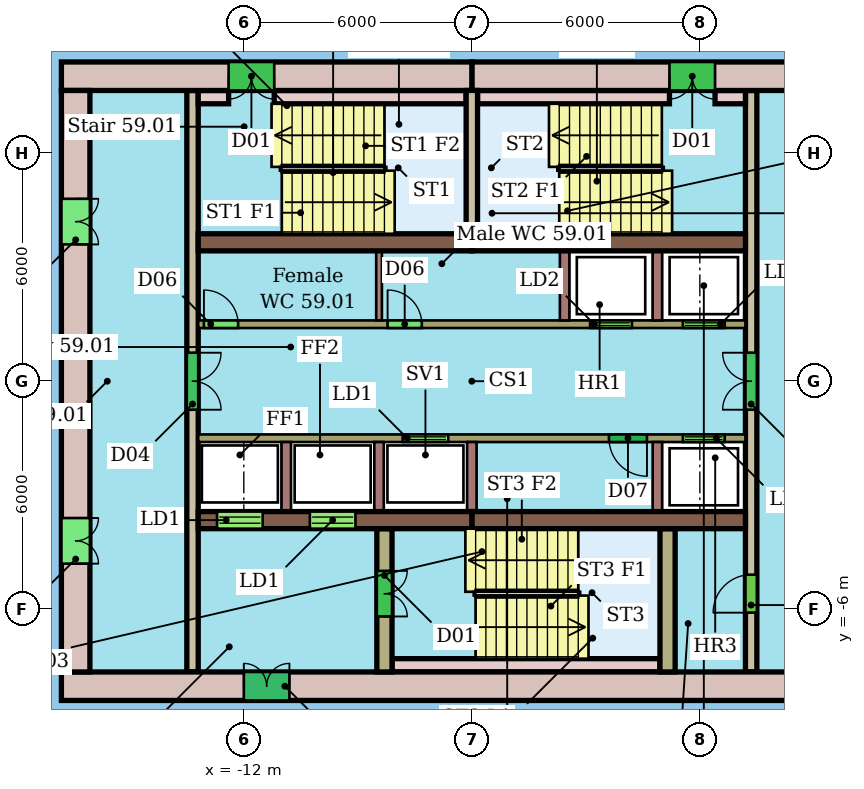
"""IFC4 building model, lengths in metres.
Left out: names, types, materials, properties, quantities, classifications, styles, units other than length and angle.
Written with IfcOpenShell. Run it as: python <this file> out.ifc"""

import sys

from ifc_helpers import new_model, si_unit, direction, frame, frame_2d, origin, place, context, subcontext, project, spatial, rectangle, extrude, element, fill, save


model = new_model("IFC4")
c1 = context("Model", 3, precision=1e-05, world=origin(), true_north=direction((0.0, 1.0)))
c2 = subcontext(c1, "Body", "Model", "MODEL_VIEW")
j1 = project(units=[si_unit("LENGTHUNIT", "METRE"), si_unit("PLANEANGLEUNIT", "RADIAN")], contexts=[c1])
p1 = place(None, origin())
s1 = spatial("IfcSite", under=j1, at=p1, CompositionType="ELEMENT")
p2 = place(p1, origin())
s2 = spatial("IfcBuilding", under=s1, at=p2, CompositionType="ELEMENT")
p3 = place(p2, frame((0.0, 0.0, 238.9)))
s3 = spatial("IfcBuildingStorey", under=s2, at=p3, CompositionType="ELEMENT", Elevation=238.9)
p4 = place(p3, frame((4.8, 8.025, 0.0), z_axis=(0.0, 0.0, 1.0), x_axis=(-1.0, 0.0, 0.0)))
e1 = element("IfcWall", 1, at=p4, inside=s3, PredefinedType="SHEAR", context=c2, shape_type="SweptSolid", body=[
    extrude(rectangle(XDim=10.8, YDim=0.75, at=frame_2d((5.4, 0.0))), origin(), (0.0, 0.0, 1.0), 3.3),
])
p5 = place(p4, frame((4.4, 0.0, 0.0)))
e2 = element("IfcOpeningElement", 2, at=p5, cuts=e1, PredefinedType="OPENING", context=c2, shape_type="SweptSolid", body=[
    extrude(rectangle(XDim=1.2, YDim=2.1, at=frame_2d((0.6, 1.05))), frame((0.0, 0.385, 0.0), z_axis=(0.0, -1.0, 0.0), x_axis=(1.0, 0.0, 0.0)), (0.0, 0.0, 1.0), 0.77),
])
p6 = place(p3, frame((-6.0, 8.025, 0.0), z_axis=(0.0, 0.0, 1.0), x_axis=(-1.0, 0.0, 0.0)))
e3 = element("IfcWall", 3, at=p6, inside=s3, PredefinedType="SHEAR", context=c2, shape_type="SweptSolid", body=[
    extrude(rectangle(XDim=10.8, YDim=0.75, at=frame_2d((5.4, 0.0))), origin(), (0.0, 0.0, 1.0), 3.3),
])
p7 = place(p6, frame((5.2, 0.0, 0.0)))
e4 = element("IfcOpeningElement", 4, at=p7, cuts=e3, PredefinedType="OPENING", context=c2, shape_type="SweptSolid", body=[
    extrude(rectangle(XDim=1.2, YDim=2.1, at=frame_2d((0.6, 1.05))), frame((0.0, 0.385, 0.0), z_axis=(0.0, -1.0, 0.0), x_axis=(1.0, 0.0, 0.0)), (0.0, 0.0, 1.0), 0.77),
])
p8 = place(p3, frame((-16.8, -8.025, 0.0), z_axis=(0.0, 0.0, 1.0), x_axis=(1.0, 0.0, 0.0)))
e5 = element("IfcWall", 5, at=p8, inside=s3, PredefinedType="SHEAR", context=c2, shape_type="SweptSolid", body=[
    extrude(rectangle(XDim=21.6, YDim=0.75, at=frame_2d((10.8, 0.0))), origin(), (0.0, 0.0, 1.0), 3.3),
])
p9 = place(p8, frame((4.8, 0.0, 0.0)))
e6 = element("IfcOpeningElement", 6, at=p9, cuts=e5, PredefinedType="OPENING", context=c2, shape_type="SweptSolid", body=[
    extrude(rectangle(XDim=1.2, YDim=2.1, at=frame_2d((0.6, 1.05))), frame((0.0, 0.385, 0.0), z_axis=(0.0, -1.0, 0.0), x_axis=(1.0, 0.0, 0.0)), (0.0, 0.0, 1.0), 0.77),
])
p10 = place(p3, frame((-16.425, 7.65, 0.0), z_axis=(0.0, 0.0, 1.0), x_axis=(0.0, -1.0, 0.0)))
e7 = element("IfcWall", 7, at=p10, inside=s3, PredefinedType="SHEAR", context=c2, shape_type="SweptSolid", body=[
    extrude(rectangle(XDim=15.3, YDim=0.75, at=frame_2d((7.65, 0.0))), origin(), (0.0, 0.0, 1.0), 3.3),
])
p11 = place(p10, frame((11.25, 0.0, 0.0)))
e8 = element("IfcOpeningElement", 8, at=p11, cuts=e7, PredefinedType="OPENING", context=c2, shape_type="SweptSolid", body=[
    extrude(rectangle(XDim=1.2, YDim=2.1, at=frame_2d((0.6, 1.05))), frame((0.0, 0.385, 0.0), z_axis=(0.0, -1.0, 0.0), x_axis=(1.0, 0.0, 0.0)), (0.0, 0.0, 1.0), 0.77),
])
p12 = place(p10, frame((2.85, 0.0, 0.0)))
e9 = element("IfcOpeningElement", 9, at=p12, cuts=e7, PredefinedType="OPENING", context=c2, shape_type="SweptSolid", body=[
    extrude(rectangle(XDim=1.2, YDim=2.1, at=frame_2d((0.6, 1.05))), frame((0.0, 0.385, 0.0), z_axis=(0.0, -1.0, 0.0), x_axis=(1.0, 0.0, 0.0)), (0.0, 0.0, 1.0), 0.77),
])
for number, where, z_axis, x_axis in (
    (10, (-13.2, 3.655, 0.0), (0.0, 0.0, 1.0), (1.0, 0.0, 0.0)),
    (11, (-6.0, 3.655, 0.0), (0.0, 0.0, 1.0), (1.0, 0.0, 0.0)),
):
    element("IfcWall", number, at=place(p3, frame(where, z_axis=z_axis, x_axis=x_axis)), inside=s3, PredefinedType="SHEAR", context=c2, shape_type="SweptSolid", body=[
        extrude(rectangle(XDim=7.2, YDim=0.45, at=frame_2d((3.6, 0.0))), origin(), (0.0, 0.0, 1.0), 3.3),
    ])
p13 = place(p3, frame((-13.2, -3.655, 0.0), z_axis=(0.0, 0.0, 1.0), x_axis=(1.0, 0.0, 0.0)))
e12 = element("IfcWall", 12, at=p13, inside=s3, PredefinedType="SHEAR", context=c2, shape_type="SweptSolid", body=[
    extrude(rectangle(XDim=7.2, YDim=0.45, at=frame_2d((3.6, 0.0))), origin(), (0.0, 0.0, 1.0), 3.3),
])
p14 = place(p13, frame((0.496, 0.0, 0.0)))
e13 = element("IfcOpeningElement", 13, at=p14, cuts=e12, PredefinedType="OPENING", context=c2, shape_type="SweptSolid", body=[
    extrude(rectangle(XDim=1.2, YDim=2.1, at=frame_2d((0.6, 1.05))), frame((0.0, 0.235, 0.0), z_axis=(0.0, -1.0, 0.0), x_axis=(1.0, 0.0, 0.0)), (0.0, 0.0, 1.0), 0.47),
])
p15 = place(p13, frame((2.938, 0.0, 0.0)))
e14 = element("IfcOpeningElement", 14, at=p15, cuts=e12, PredefinedType="OPENING", context=c2, shape_type="SweptSolid", body=[
    extrude(rectangle(XDim=1.2, YDim=2.1, at=frame_2d((0.6, 1.05))), frame((0.0, 0.235, 0.0), z_axis=(0.0, -1.0, 0.0), x_axis=(1.0, 0.0, 0.0)), (0.0, 0.0, 1.0), 0.47),
])
p16 = place(p3, frame((-6.0, -3.655, 0.0), z_axis=(0.0, 0.0, 1.0), x_axis=(1.0, 0.0, 0.0)))
e15 = element("IfcWall", 15, at=p16, inside=s3, PredefinedType="SHEAR", context=c2, shape_type="SweptSolid", body=[
    extrude(rectangle(XDim=7.2, YDim=0.45, at=frame_2d((3.6, 0.0))), origin(), (0.0, 0.0, 1.0), 3.3),
])
p17 = place(p3, frame((-13.35, 7.65, 0.0), z_axis=(0.0, 0.0, 1.0), x_axis=(0.0, -1.0, 0.0)))
e16 = element("IfcWall", 16, at=p17, inside=s3, PredefinedType="SHEAR", context=c2, shape_type="SweptSolid", body=[
    extrude(rectangle(XDim=15.3, YDim=0.3, at=frame_2d((7.65, 0.0))), origin(), (0.0, 0.0, 1.0), 3.3),
])
p18 = place(p17, frame((6.9, 0.0, 0.0)))
e17 = element("IfcOpeningElement", 17, at=p18, cuts=e16, PredefinedType="OPENING", context=c2, shape_type="SweptSolid", body=[
    extrude(rectangle(XDim=1.5, YDim=2.1, at=frame_2d((0.75, 1.05))), frame((0.0, 0.16, 0.0), z_axis=(0.0, -1.0, 0.0), x_axis=(1.0, 0.0, 0.0)), (0.0, 0.0, 1.0), 0.32),
])
p19 = place(p3, frame((1.35, -7.65, 0.0), z_axis=(0.0, 0.0, 1.0), x_axis=(0.0, 1.0, 0.0)))
e18 = element("IfcWall", 18, at=p19, inside=s3, PredefinedType="SHEAR", context=c2, shape_type="SweptSolid", body=[
    extrude(rectangle(XDim=15.3, YDim=0.3, at=frame_2d((7.65, 0.0))), origin(), (0.0, 0.0, 1.0), 3.3),
])
p20 = place(p19, frame((1.56, 0.0, 0.0)))
e19 = element("IfcOpeningElement", 19, at=p20, cuts=e18, PredefinedType="OPENING", context=c2, shape_type="SweptSolid", body=[
    extrude(rectangle(XDim=1.0, YDim=2.1, at=frame_2d((0.5, 1.05))), frame((0.0, 0.16, 0.0), z_axis=(0.0, -1.0, 0.0), x_axis=(1.0, 0.0, 0.0)), (0.0, 0.0, 1.0), 0.32),
])
p21 = place(p19, frame((6.9, 0.0, 0.0)))
e20 = element("IfcOpeningElement", 20, at=p21, cuts=e18, PredefinedType="OPENING", context=c2, shape_type="SweptSolid", body=[
    extrude(rectangle(XDim=1.5, YDim=2.1, at=frame_2d((0.75, 1.05))), frame((0.0, 0.16, 0.0), z_axis=(0.0, -1.0, 0.0), x_axis=(1.0, 0.0, 0.0)), (0.0, 0.0, 1.0), 0.32),
])
p22 = place(p3, frame((-13.2, 1.5, 0.0), z_axis=(0.0, 0.0, 1.0), x_axis=(1.0, 0.0, 0.0)))
e21 = element("IfcWall", 21, at=p22, inside=s3, PredefinedType="SHEAR", context=c2, shape_type="SweptSolid", body=[
    extrude(rectangle(XDim=14.4, YDim=0.2, at=frame_2d((7.2, 0.0))), origin(), (0.0, 0.0, 1.0), 3.3),
])
p23 = place(p22, frame((10.312, 0.0, 0.0)))
e22 = element("IfcOpeningElement", 22, at=p23, cuts=e21, PredefinedType="OPENING", context=c2, shape_type="SweptSolid", body=[
    extrude(rectangle(XDim=1.1, YDim=2.1, at=frame_2d((0.55, 1.05))), frame((0.0, 0.11, 0.0), z_axis=(0.0, -1.0, 0.0), x_axis=(1.0, 0.0, 0.0)), (0.0, 0.0, 1.0), 0.22),
])
p24 = place(p22, frame((12.754, 0.0, 0.0)))
e23 = element("IfcOpeningElement", 23, at=p24, cuts=e21, PredefinedType="OPENING", context=c2, shape_type="SweptSolid", body=[
    extrude(rectangle(XDim=1.1, YDim=2.1, at=frame_2d((0.55, 1.05))), frame((0.0, 0.11, 0.0), z_axis=(0.0, -1.0, 0.0), x_axis=(1.0, 0.0, 0.0)), (0.0, 0.0, 1.0), 0.22),
])
p25 = place(p22, frame((0.15, 0.0, 0.0)))
e24 = element("IfcOpeningElement", 24, at=p25, cuts=e21, PredefinedType="OPENING", context=c2, shape_type="SweptSolid", body=[
    extrude(rectangle(XDim=0.9, YDim=2.1, at=frame_2d((0.45, 1.05))), frame((0.0, 0.11, 0.0), z_axis=(0.0, -1.0, 0.0), x_axis=(1.0, 0.0, 0.0)), (0.0, 0.0, 1.0), 0.22),
])
p26 = place(p22, frame((4.983, 0.0, 0.0)))
e25 = element("IfcOpeningElement", 25, at=p26, cuts=e21, PredefinedType="OPENING", context=c2, shape_type="SweptSolid", body=[
    extrude(rectangle(XDim=0.9, YDim=2.1, at=frame_2d((0.45, 1.05))), frame((0.0, 0.11, 0.0), z_axis=(0.0, -1.0, 0.0), x_axis=(1.0, 0.0, 0.0)), (0.0, 0.0, 1.0), 0.22),
])
p27 = place(p3, frame((1.2, -1.5, 0.0), z_axis=(0.0, 0.0, 1.0), x_axis=(-1.0, 0.0, 0.0)))
e26 = element("IfcWall", 26, at=p27, inside=s3, PredefinedType="SHEAR", context=c2, shape_type="SweptSolid", body=[
    extrude(rectangle(XDim=14.4, YDim=0.2, at=frame_2d((7.2, 0.0))), origin(), (0.0, 0.0, 1.0), 3.3),
])
p28 = place(p27, frame((7.821, 0.0, 0.0)))
e27 = element("IfcOpeningElement", 27, at=p28, cuts=e26, PredefinedType="OPENING", context=c2, shape_type="SweptSolid", body=[
    extrude(rectangle(XDim=1.2, YDim=2.1, at=frame_2d((0.6, 1.05))), frame((0.0, 0.11, 0.0), z_axis=(0.0, -1.0, 0.0), x_axis=(1.0, 0.0, 0.0)), (0.0, 0.0, 1.0), 0.22),
])
p29 = place(p27, frame((0.546, 0.0, 0.0)))
e28 = element("IfcOpeningElement", 28, at=p29, cuts=e26, PredefinedType="OPENING", context=c2, shape_type="SweptSolid", body=[
    extrude(rectangle(XDim=1.1, YDim=2.1, at=frame_2d((0.55, 1.05))), frame((0.0, 0.11, 0.0), z_axis=(0.0, -1.0, 0.0), x_axis=(1.0, 0.0, 0.0)), (0.0, 0.0, 1.0), 0.22),
])
p30 = place(p27, frame((2.592, 0.0, 0.0)))
e29 = element("IfcOpeningElement", 29, at=p30, cuts=e26, PredefinedType="OPENING", context=c2, shape_type="SweptSolid", body=[
    extrude(rectangle(XDim=1.0, YDim=2.1, at=frame_2d((0.5, 1.05))), frame((0.0, 0.11, 0.0), z_axis=(0.0, -1.0, 0.0), x_axis=(1.0, 0.0, 0.0)), (0.0, 0.0, 1.0), 0.22),
])
p31 = place(p3, frame((-8.3, -3.88, 0.0), z_axis=(0.0, 0.0, 1.0), x_axis=(0.0, -1.0, 0.0)))
e30 = element("IfcWall", 30, at=p31, inside=s3, PredefinedType="SHEAR", context=c2, shape_type="SweptSolid", body=[
    extrude(rectangle(XDim=3.77, YDim=0.4, at=frame_2d((1.885, 0.0))), origin(), (0.0, 0.0, 1.0), 3.3),
])
p32 = place(p31, frame((1.11, 0.0, 0.0)))
e31 = element("IfcOpeningElement", 31, at=p32, cuts=e30, PredefinedType="OPENING", context=c2, shape_type="SweptSolid", body=[
    extrude(rectangle(XDim=1.2, YDim=2.1, at=frame_2d((0.6, 1.05))), frame((0.0, 0.21, 0.0), z_axis=(0.0, -1.0, 0.0), x_axis=(1.0, 0.0, 0.0)), (0.0, 0.0, 1.0), 0.42),
])
p33 = place(p3, frame((-0.85, -3.88, 0.0), z_axis=(0.0, 0.0, 1.0), x_axis=(0.0, -1.0, 0.0)))
e32 = element("IfcWall", 32, at=p33, inside=s3, PredefinedType="SHEAR", context=c2, shape_type="SweptSolid", body=[
    extrude(rectangle(XDim=3.77, YDim=0.4, at=frame_2d((1.885, 0.0))), origin(), (0.0, 0.0, 1.0), 3.3),
])
p34 = place(p3, frame((-6.0, 3.88, 0.0), z_axis=(0.0, 0.0, 1.0), x_axis=(0.0, 1.0, 0.0)))
e33 = element("IfcWall", 33, at=p34, inside=s3, PredefinedType="SHEAR", context=c2, shape_type="SweptSolid", body=[
    extrude(rectangle(XDim=3.77, YDim=0.3, at=frame_2d((1.885, 0.0))), origin(), (0.0, 0.0, 1.0), 3.3),
])
p35 = place(p3, frame((-13.2, 7.475, 0.0), z_axis=(0.0, 0.0, 1.0), x_axis=(1.0, 0.0, 0.0)))
e34 = element("IfcWall", 34, at=p35, inside=s3, PredefinedType="SHEAR", context=c2, shape_type="SweptSolid", body=[
    extrude(rectangle(XDim=0.8, YDim=0.35, at=frame_2d((0.4, 0.0))), origin(), (0.0, 0.0, 1.0), 3.3),
])
for number, where, z_axis, x_axis in (
    (35, (-11.2, 7.475, 0.0), (0.0, 0.0, 1.0), (1.0, 0.0, 0.0)),
    (36, (-5.85, 7.475, 0.0), (0.0, 0.0, 1.0), (1.0, 0.0, 0.0)),
):
    element("IfcWall", number, at=place(p3, frame(where, z_axis=z_axis, x_axis=x_axis)), inside=s3, PredefinedType="SHEAR", context=c2, shape_type="SweptSolid", body=[
        extrude(rectangle(XDim=5.05, YDim=0.35, at=frame_2d((2.525, 0.0))), origin(), (0.0, 0.0, 1.0), 3.3),
    ])
p36 = place(p3, frame((0.4, 7.475, 0.0), z_axis=(0.0, 0.0, 1.0), x_axis=(1.0, 0.0, 0.0)))
e37 = element("IfcWall", 37, at=p36, inside=s3, PredefinedType="SHEAR", context=c2, shape_type="SweptSolid", body=[
    extrude(rectangle(XDim=0.8, YDim=0.35, at=frame_2d((0.4, 0.0))), origin(), (0.0, 0.0, 1.0), 3.3),
])
p37 = place(p3, frame((-8.1, -7.475, 0.0), z_axis=(0.0, 0.0, 1.0), x_axis=(1.0, 0.0, 0.0)))
e38 = element("IfcWall", 38, at=p37, inside=s3, PredefinedType="SHEAR", context=c2, shape_type="SweptSolid", body=[
    extrude(rectangle(XDim=7.05, YDim=0.35, at=frame_2d((3.525, 0.0))), origin(), (0.0, 0.0, 1.0), 3.3),
])
for number, where, z_axis, x_axis in (
    (39, (-3.558, 1.6, 0.0), (0.0, 0.0, 1.0), (0.0, 1.0, 0.0)),
    (40, (-1.117, 1.6, 0.0), (0.0, 0.0, 1.0), (0.0, 1.0, 0.0)),
):
    element("IfcWall", number, at=place(p3, frame(where, z_axis=z_axis, x_axis=x_axis)), inside=s3, PredefinedType="SHEAR", context=c2, shape_type="SweptSolid", body=[
        extrude(rectangle(XDim=1.83, YDim=0.25, at=frame_2d((0.915, 0.0))), origin(), (0.0, 0.0, 1.0), 3.3),
    ])
p38 = place(p3, frame((-8.442, 1.6, 0.0), z_axis=(0.0, 0.0, 1.0), x_axis=(0.0, 1.0, 0.0)))
e41 = element("IfcWall", 41, at=p38, inside=s3, PredefinedType="PARTITIONING", context=c2, shape_type="SweptSolid", body=[
    extrude(rectangle(XDim=1.83, YDim=0.15, at=frame_2d((0.915, 0.0))), origin(), (0.0, 0.0, 1.0), 3.3),
])
for number, where, z_axis, x_axis in (
    (42, (-10.883, -1.6, 0.0), (0.0, 0.0, 1.0), (0.0, -1.0, 0.0)),
    (43, (-8.442, -1.6, 0.0), (0.0, 0.0, 1.0), (0.0, -1.0, 0.0)),
    (44, (-6.0, -1.6, 0.0), (0.0, 0.0, 1.0), (0.0, -1.0, 0.0)),
    (45, (-1.117, -1.6, 0.0), (0.0, 0.0, 1.0), (0.0, -1.0, 0.0)),
):
    element("IfcWall", number, at=place(p3, frame(where, z_axis=z_axis, x_axis=x_axis)), inside=s3, PredefinedType="SHEAR", context=c2, shape_type="SweptSolid", body=[
        extrude(rectangle(XDim=1.83, YDim=0.25, at=frame_2d((0.915, 0.0))), origin(), (0.0, 0.0, 1.0), 3.3),
    ])
p39 = place(p5, origin())
e46 = element("IfcDoor", 46, at=p39, inside=s3, OperationType="DOUBLE_DOOR_SINGLE_SWING", PredefinedType="NOTDEFINED", context=c2, shape_type="SweptSolid", body=[
    extrude(rectangle(XDim=1.2, YDim=2.1, at=frame_2d((0.6, 1.05))), frame((0.0, 0.025, 0.0), z_axis=(0.0, -1.0, 0.0), x_axis=(1.0, 0.0, 0.0)), (0.0, 0.0, 1.0), 0.05),
])
fill(e2, e46)
p40 = place(p7, origin())
e47 = element("IfcDoor", 47, at=p40, inside=s3, OperationType="DOUBLE_DOOR_SINGLE_SWING", PredefinedType="NOTDEFINED", context=c2, shape_type="SweptSolid", body=[
    extrude(rectangle(XDim=1.2, YDim=2.1, at=frame_2d((0.6, 1.05))), frame((0.0, 0.025, 0.0), z_axis=(0.0, -1.0, 0.0), x_axis=(1.0, 0.0, 0.0)), (0.0, 0.0, 1.0), 0.05),
])
fill(e4, e47)
p41 = place(p9, origin())
e48 = element("IfcDoor", 48, at=p41, inside=s3, OperationType="DOUBLE_DOOR_SINGLE_SWING", PredefinedType="NOTDEFINED", context=c2, shape_type="SweptSolid", body=[
    extrude(rectangle(XDim=1.2, YDim=2.1, at=frame_2d((0.6, 1.05))), frame((0.0, 0.025, 0.0), z_axis=(0.0, -1.0, 0.0), x_axis=(1.0, 0.0, 0.0)), (0.0, 0.0, 1.0), 0.05),
])
fill(e6, e48)
p42 = place(p11, origin())
e49 = element("IfcDoor", 49, at=p42, inside=s3, OperationType="DOUBLE_DOOR_SINGLE_SWING", PredefinedType="NOTDEFINED", context=c2, shape_type="SweptSolid", body=[
    extrude(rectangle(XDim=1.2, YDim=2.1, at=frame_2d((0.6, 1.05))), frame((0.0, 0.025, 0.0), z_axis=(0.0, -1.0, 0.0), x_axis=(1.0, 0.0, 0.0)), (0.0, 0.0, 1.0), 0.05),
])
fill(e8, e49)
p43 = place(p12, origin())
e50 = element("IfcDoor", 50, at=p43, inside=s3, OperationType="DOUBLE_DOOR_SINGLE_SWING", PredefinedType="NOTDEFINED", context=c2, shape_type="SweptSolid", body=[
    extrude(rectangle(XDim=1.2, YDim=2.1, at=frame_2d((0.6, 1.05))), frame((0.0, 0.025, 0.0), z_axis=(0.0, -1.0, 0.0), x_axis=(1.0, 0.0, 0.0)), (0.0, 0.0, 1.0), 0.05),
])
fill(e9, e50)
p44 = place(p14, origin())
e51 = element("IfcDoor", 51, at=p44, inside=s3, OperationType="DOUBLE_DOOR_SLIDING", PredefinedType="NOTDEFINED", context=c2, shape_type="SweptSolid", body=[
    extrude(rectangle(XDim=1.2, YDim=2.1, at=frame_2d((0.6, 1.05))), frame((0.0, 0.025, 0.0), z_axis=(0.0, -1.0, 0.0), x_axis=(1.0, 0.0, 0.0)), (0.0, 0.0, 1.0), 0.05),
])
fill(e13, e51)
p45 = place(p15, origin())
e52 = element("IfcDoor", 52, at=p45, inside=s3, OperationType="DOUBLE_DOOR_SLIDING", PredefinedType="NOTDEFINED", context=c2, shape_type="SweptSolid", body=[
    extrude(rectangle(XDim=1.2, YDim=2.1, at=frame_2d((0.6, 1.05))), frame((0.0, 0.025, 0.0), z_axis=(0.0, -1.0, 0.0), x_axis=(1.0, 0.0, 0.0)), (0.0, 0.0, 1.0), 0.05),
])
fill(e14, e52)
p46 = place(p18, origin())
e53 = element("IfcDoor", 53, at=p46, inside=s3, OperationType="DOUBLE_DOOR_SINGLE_SWING", PredefinedType="NOTDEFINED", context=c2, shape_type="SweptSolid", body=[
    extrude(rectangle(XDim=1.5, YDim=2.1, at=frame_2d((0.75, 1.05))), frame((0.0, 0.025, 0.0), z_axis=(0.0, -1.0, 0.0), x_axis=(1.0, 0.0, 0.0)), (0.0, 0.0, 1.0), 0.05),
])
fill(e17, e53)
p47 = place(p20, origin())
e54 = element("IfcDoor", 54, at=p47, inside=s3, OperationType="SINGLE_SWING_LEFT", PredefinedType="NOTDEFINED", context=c2, shape_type="SweptSolid", body=[
    extrude(rectangle(XDim=1.0, YDim=2.1, at=frame_2d((0.5, 1.05))), frame((0.0, 0.025, 0.0), z_axis=(0.0, -1.0, 0.0), x_axis=(1.0, 0.0, 0.0)), (0.0, 0.0, 1.0), 0.05),
])
fill(e19, e54)
p48 = place(p21, origin())
e55 = element("IfcDoor", 55, at=p48, inside=s3, OperationType="DOUBLE_DOOR_SINGLE_SWING", PredefinedType="NOTDEFINED", context=c2, shape_type="SweptSolid", body=[
    extrude(rectangle(XDim=1.5, YDim=2.1, at=frame_2d((0.75, 1.05))), frame((0.0, 0.025, 0.0), z_axis=(0.0, -1.0, 0.0), x_axis=(1.0, 0.0, 0.0)), (0.0, 0.0, 1.0), 0.05),
])
fill(e20, e55)
p49 = place(p23, origin())
e56 = element("IfcDoor", 56, at=p49, inside=s3, OperationType="DOUBLE_DOOR_SLIDING", PredefinedType="NOTDEFINED", context=c2, shape_type="SweptSolid", body=[
    extrude(rectangle(XDim=1.1, YDim=2.1, at=frame_2d((0.55, 1.05))), frame((0.0, 0.025, 0.0), z_axis=(0.0, -1.0, 0.0), x_axis=(1.0, 0.0, 0.0)), (0.0, 0.0, 1.0), 0.05),
])
fill(e22, e56)
p50 = place(p24, origin())
e57 = element("IfcDoor", 57, at=p50, inside=s3, OperationType="DOUBLE_DOOR_SLIDING", PredefinedType="NOTDEFINED", context=c2, shape_type="SweptSolid", body=[
    extrude(rectangle(XDim=1.1, YDim=2.1, at=frame_2d((0.55, 1.05))), frame((0.0, 0.025, 0.0), z_axis=(0.0, -1.0, 0.0), x_axis=(1.0, 0.0, 0.0)), (0.0, 0.0, 1.0), 0.05),
])
fill(e23, e57)
p51 = place(p25, origin())
e58 = element("IfcDoor", 58, at=p51, inside=s3, OperationType="SINGLE_SWING_LEFT", PredefinedType="NOTDEFINED", context=c2, shape_type="SweptSolid", body=[
    extrude(rectangle(XDim=0.9, YDim=2.1, at=frame_2d((0.45, 1.05))), frame((0.0, 0.025, 0.0), z_axis=(0.0, -1.0, 0.0), x_axis=(1.0, 0.0, 0.0)), (0.0, 0.0, 1.0), 0.05),
])
fill(e24, e58)
p52 = place(p26, origin())
e59 = element("IfcDoor", 59, at=p52, inside=s3, OperationType="SINGLE_SWING_LEFT", PredefinedType="NOTDEFINED", context=c2, shape_type="SweptSolid", body=[
    extrude(rectangle(XDim=0.9, YDim=2.1, at=frame_2d((0.45, 1.05))), frame((0.0, 0.025, 0.0), z_axis=(0.0, -1.0, 0.0), x_axis=(1.0, 0.0, 0.0)), (0.0, 0.0, 1.0), 0.05),
])
fill(e25, e59)
p53 = place(p28, origin())
e60 = element("IfcDoor", 60, at=p53, inside=s3, OperationType="DOUBLE_DOOR_SLIDING", PredefinedType="NOTDEFINED", context=c2, shape_type="SweptSolid", body=[
    extrude(rectangle(XDim=1.2, YDim=2.1, at=frame_2d((0.6, 1.05))), frame((0.0, 0.025, 0.0), z_axis=(0.0, -1.0, 0.0), x_axis=(1.0, 0.0, 0.0)), (0.0, 0.0, 1.0), 0.05),
])
fill(e27, e60)
p54 = place(p29, origin())
e61 = element("IfcDoor", 61, at=p54, inside=s3, OperationType="DOUBLE_DOOR_SLIDING", PredefinedType="NOTDEFINED", context=c2, shape_type="SweptSolid", body=[
    extrude(rectangle(XDim=1.1, YDim=2.1, at=frame_2d((0.55, 1.05))), frame((0.0, 0.025, 0.0), z_axis=(0.0, -1.0, 0.0), x_axis=(1.0, 0.0, 0.0)), (0.0, 0.0, 1.0), 0.05),
])
fill(e28, e61)
p55 = place(p30, origin())
e62 = element("IfcDoor", 62, at=p55, inside=s3, OperationType="SINGLE_SWING_LEFT", PredefinedType="NOTDEFINED", context=c2, shape_type="SweptSolid", body=[
    extrude(rectangle(XDim=1.0, YDim=2.1, at=frame_2d((0.5, 1.05))), frame((0.0, 0.025, 0.0), z_axis=(0.0, -1.0, 0.0), x_axis=(1.0, 0.0, 0.0)), (0.0, 0.0, 1.0), 0.05),
])
fill(e29, e62)
p56 = place(p32, origin())
e63 = element("IfcDoor", 63, at=p56, inside=s3, OperationType="DOUBLE_DOOR_SINGLE_SWING", PredefinedType="NOTDEFINED", context=c2, shape_type="SweptSolid", body=[
    extrude(rectangle(XDim=1.2, YDim=2.1, at=frame_2d((0.6, 1.05))), frame((0.0, 0.025, 0.0), z_axis=(0.0, -1.0, 0.0), x_axis=(1.0, 0.0, 0.0)), (0.0, 0.0, 1.0), 0.05),
])
fill(e31, e63)
save(model, sys.argv[1])
